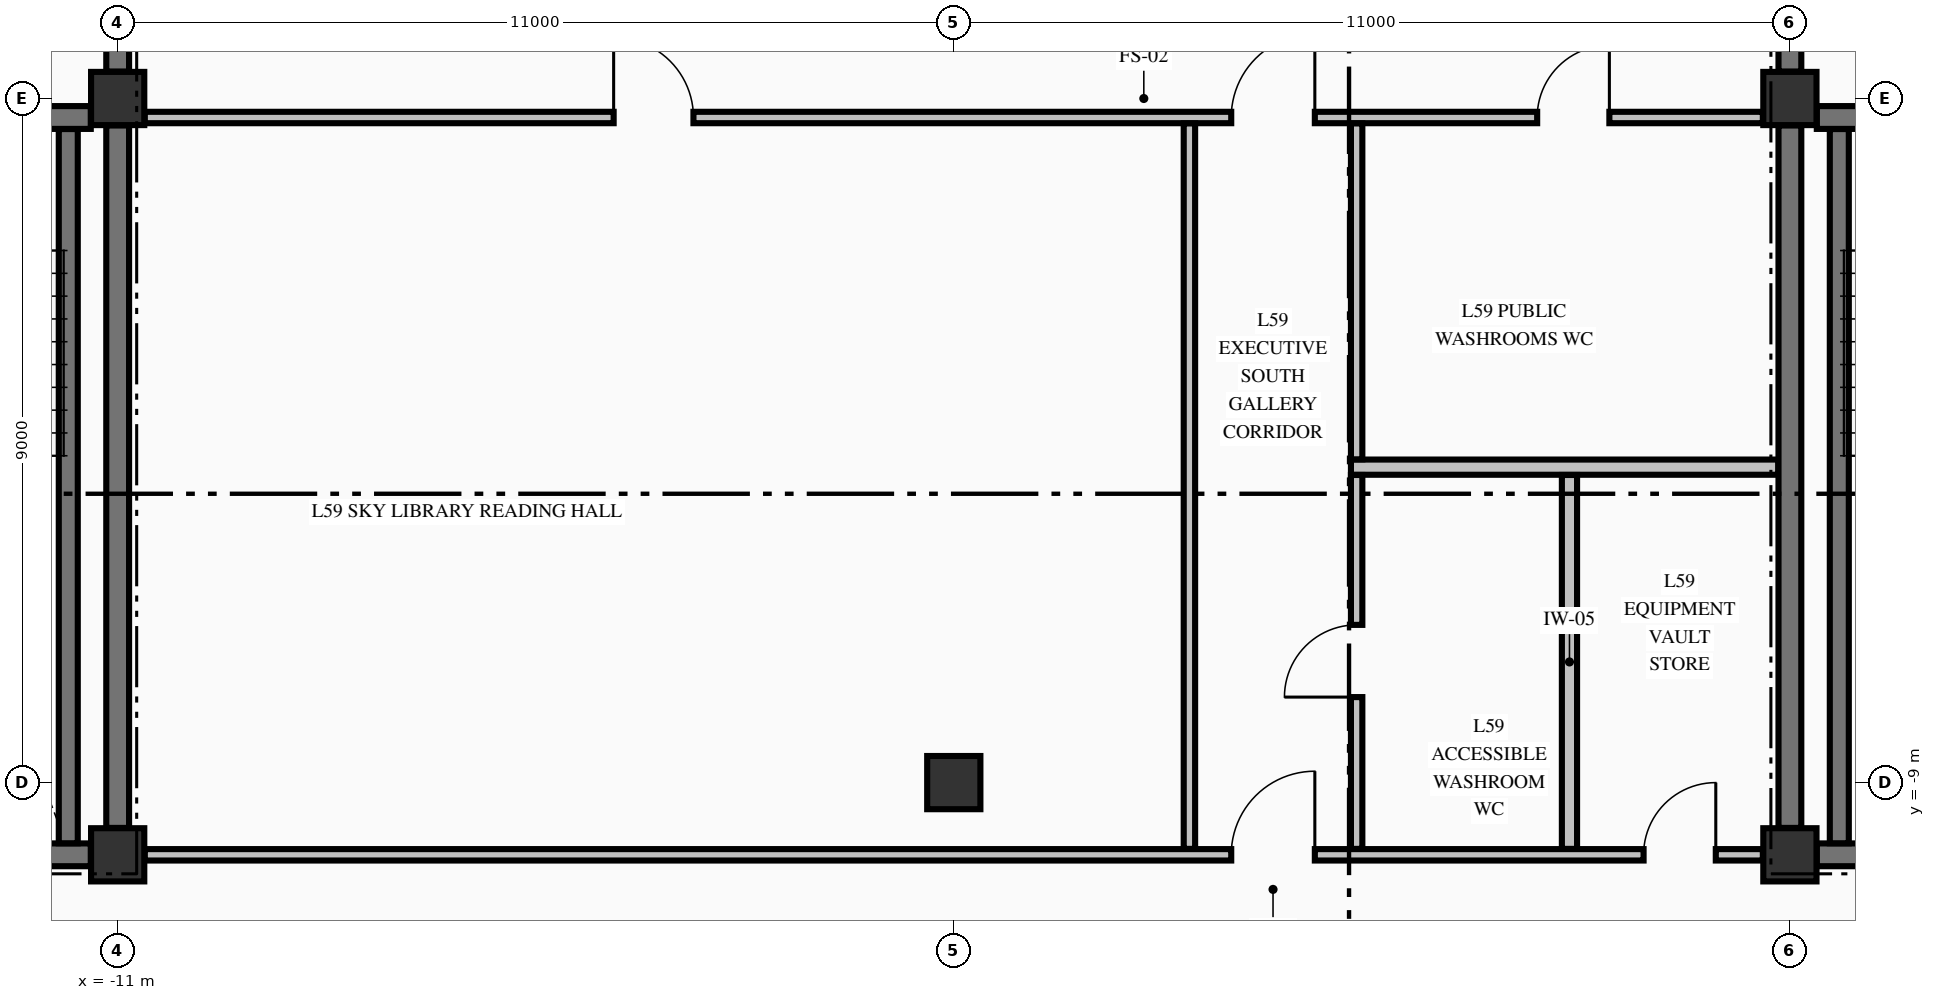
"""IFC4 building model, lengths in metres.
Left out: names, types, materials, properties, quantities, classifications, styles, units other than length and angle.
Written with IfcOpenShell. Run it as: python <this file> out.ifc"""

import sys

from ifc_helpers import new_model, si_unit, direction, frame, frame_2d, origin, origin_2d, place, context, subcontext, project, spatial, rectangle, extrude, element, fill, save


model = new_model("IFC4")
c1 = context("Model", 3, precision=1e-05, world=origin(), true_north=direction((0.0, 1.0)))
c2 = subcontext(c1, "Body", "Model", "MODEL_VIEW")
j1 = project(units=[si_unit("LENGTHUNIT", "METRE"), si_unit("PLANEANGLEUNIT", "RADIAN")], contexts=[c1])
p1 = place(None, origin())
s1 = spatial("IfcSite", under=j1, at=p1, CompositionType="ELEMENT")
p2 = place(p1, origin())
s2 = spatial("IfcBuilding", under=s1, at=p2, CompositionType="ELEMENT")
p3 = place(p2, frame((0.0, 0.0, 226.82)))
s3 = spatial("IfcBuildingStorey", under=s2, at=p3, CompositionType="ELEMENT", Elevation=226.82)
for number, where, z_axis, x_axis in (
    (1, (-11.0, -9.95, -0.425), (0.0, 0.0, 1.0), (1.0, 0.0, 0.0)),
    (2, (-11.0, 0.0, -0.425), (0.0, 0.0, 1.0), (1.0, 0.0, 0.0)),
    (3, (11.0, -9.95, -0.425), (0.0, 0.0, 1.0), (1.0, 0.0, 0.0)),
    (4, (11.0, 0.0, -0.425), (0.0, 0.0, 1.0), (1.0, 0.0, 0.0)),
    (5, (0.0, -9.0, -0.425), (0.0, 0.0, 1.0), (1.0, 0.0, 0.0)),
):
    element("IfcColumn", number, at=place(p3, frame(where, z_axis=z_axis, x_axis=x_axis)), inside=s3, PredefinedType="COLUMN", context=c2, shape_type="SweptSolid", body=[
        extrude(rectangle(XDim=0.7, YDim=0.7, at=origin_2d()), origin(), (0.0, 0.0, 1.0), 3.405),
    ])
for number, where, z_axis, x_axis in (
    (6, (-14.7, -9.95, 0.0), (0.0, 0.0, 1.0), (1.0, 0.0, 0.0)),
    (7, (11.354, -9.95, 0.0), (0.0, 0.0, 1.0), (1.0, 0.0, 0.0)),
):
    element("IfcWall", number, at=place(p3, frame(where, z_axis=z_axis, x_axis=x_axis)), inside=s3, PredefinedType="SHEAR", context=c2, shape_type="SweptSolid", body=[
        extrude(rectangle(XDim=3.346, YDim=0.3, at=frame_2d((1.673, 0.0))), origin(), (0.0, 0.0, 1.0), 2.98),
    ])
p4 = place(p3, frame((-20.571, -0.25, 0.0), z_axis=(0.0, 0.0, 1.0), x_axis=(1.0, 0.0, 0.0)))
e8 = element("IfcWall", 8, at=p4, inside=s3, PredefinedType="SHEAR", context=c2, shape_type="SweptSolid", body=[
    extrude(rectangle(XDim=9.217, YDim=0.3, at=frame_2d((4.608, 0.0))), origin(), (0.0, 0.0, 1.0), 2.98),
])
p5 = place(p4, frame((6.871, 0.0, 0.0)))
e9 = element("IfcOpeningElement", 9, at=p5, cuts=e8, PredefinedType="OPENING", context=c2, shape_type="SweptSolid", body=[
    extrude(rectangle(XDim=1.1, YDim=2.15, at=frame_2d((0.55, 1.075))), frame((0.0, 0.16, 0.0), z_axis=(0.0, -1.0, 0.0), x_axis=(1.0, 0.0, 0.0)), (0.0, 0.0, 1.0), 0.32),
])
p6 = place(p3, frame((11.354, -0.25, 0.0), z_axis=(0.0, 0.0, 1.0), x_axis=(1.0, 0.0, 0.0)))
e10 = element("IfcWall", 10, at=p6, inside=s3, PredefinedType="SHEAR", context=c2, shape_type="SweptSolid", body=[
    extrude(rectangle(XDim=3.521, YDim=0.3, at=frame_2d((1.76, 0.0))), origin(), (0.0, 0.0, 1.0), 2.98),
])
p7 = place(p6, frame((1.246, 0.0, 0.0)))
e11 = element("IfcOpeningElement", 11, at=p7, cuts=e10, PredefinedType="OPENING", context=c2, shape_type="SweptSolid", body=[
    extrude(rectangle(XDim=1.1, YDim=2.15, at=frame_2d((0.55, 1.075))), frame((0.0, 0.16, 0.0), z_axis=(0.0, -1.0, 0.0), x_axis=(1.0, 0.0, 0.0)), (0.0, 0.0, 1.0), 0.32),
])
p8 = place(p3, frame((-10.644, -9.95, 0.0), z_axis=(0.0, 0.0, 1.0), x_axis=(1.0, 0.0, 0.0)))
e12 = element("IfcWall", 12, at=p8, inside=s3, PredefinedType="PARTITIONING", context=c2, shape_type="SweptSolid", body=[
    extrude(rectangle(XDim=21.288, YDim=0.15, at=frame_2d((10.644, 0.0))), origin(), (0.0, 0.0, 1.0), 2.98),
])
p9 = place(p8, frame((14.294, 0.0, 0.0)))
e13 = element("IfcOpeningElement", 13, at=p9, cuts=e12, PredefinedType="OPENING", context=c2, shape_type="SweptSolid", body=[
    extrude(rectangle(XDim=1.1, YDim=2.15, at=frame_2d((0.55, 1.075))), frame((0.0, 0.085, 0.0), z_axis=(0.0, -1.0, 0.0), x_axis=(1.0, 0.0, 0.0)), (0.0, 0.0, 1.0), 0.17),
])
p10 = place(p8, frame((19.719, 0.0, 0.0)))
e14 = element("IfcOpeningElement", 14, at=p10, cuts=e12, PredefinedType="OPENING", context=c2, shape_type="SweptSolid", body=[
    extrude(rectangle(XDim=0.95, YDim=2.15, at=frame_2d((0.475, 1.075))), frame((0.0, 0.085, 0.0), z_axis=(0.0, -1.0, 0.0), x_axis=(1.0, 0.0, 0.0)), (0.0, 0.0, 1.0), 0.17),
])
p11 = place(p3, frame((5.225, -4.85, 0.0), z_axis=(0.0, 0.0, 1.0), x_axis=(1.0, 0.0, 0.0)))
e15 = element("IfcWall", 15, at=p11, inside=s3, PredefinedType="PARTITIONING", context=c2, shape_type="SweptSolid", body=[
    extrude(rectangle(XDim=5.622, YDim=0.2, at=frame_2d((2.811, 0.0))), origin(), (0.0, 0.0, 1.0), 2.98),
])
p12 = place(p3, frame((-10.644, -0.25, 0.0), z_axis=(0.0, 0.0, 1.0), x_axis=(1.0, 0.0, 0.0)))
e16 = element("IfcWall", 16, at=p12, inside=s3, PredefinedType="PARTITIONING", context=c2, shape_type="SweptSolid", body=[
    extrude(rectangle(XDim=21.288, YDim=0.15, at=frame_2d((10.644, 0.0))), origin(), (0.0, 0.0, 1.0), 2.98),
])
p13 = place(p12, frame((14.294, 0.0, 0.0)))
e17 = element("IfcOpeningElement", 17, at=p13, cuts=e16, PredefinedType="OPENING", context=c2, shape_type="SweptSolid", body=[
    extrude(rectangle(XDim=1.1, YDim=2.15, at=frame_2d((0.55, 1.075))), frame((0.0, 0.085, 0.0), z_axis=(0.0, -1.0, 0.0), x_axis=(1.0, 0.0, 0.0)), (0.0, 0.0, 1.0), 0.17),
])
p14 = place(p12, frame((6.169, 0.0, 0.0)))
e18 = element("IfcOpeningElement", 18, at=p14, cuts=e16, PredefinedType="OPENING", context=c2, shape_type="SweptSolid", body=[
    extrude(rectangle(XDim=1.05, YDim=2.15, at=frame_2d((0.525, 1.075))), frame((0.0, 0.085, 0.0), z_axis=(0.0, -1.0, 0.0), x_axis=(1.0, 0.0, 0.0)), (0.0, 0.0, 1.0), 0.17),
])
p15 = place(p12, frame((18.319, 0.0, 0.0)))
e19 = element("IfcOpeningElement", 19, at=p15, cuts=e16, PredefinedType="OPENING", context=c2, shape_type="SweptSolid", body=[
    extrude(rectangle(XDim=0.95, YDim=2.15, at=frame_2d((0.475, 1.075))), frame((0.0, 0.085, 0.0), z_axis=(0.0, -1.0, 0.0), x_axis=(1.0, 0.0, 0.0)), (0.0, 0.0, 1.0), 0.17),
])
p16 = place(p3, frame((-11.65, -9.798, 0.0), z_axis=(0.0, 0.0, 1.0), x_axis=(0.0, 1.0, 0.0)))
e20 = element("IfcWall", 20, at=p16, inside=s3, PredefinedType="SOLIDWALL", context=c2, shape_type="SweptSolid", body=[
    extrude(rectangle(XDim=9.396, YDim=0.25, at=frame_2d((4.698, 0.0))), origin(), (0.0, 0.0, 1.0), 2.98),
])
p17 = place(p3, frame((-11.0, -9.596, 0.0), z_axis=(0.0, 0.0, 1.0), x_axis=(0.0, 1.0, 0.0)))
e21 = element("IfcWall", 21, at=p17, inside=s3, PredefinedType="SHEAR", context=c2, shape_type="SweptSolid", body=[
    extrude(rectangle(XDim=9.242, YDim=0.3, at=frame_2d((4.621, 0.0))), origin(), (0.0, 0.0, 1.0), 2.98),
])
p18 = place(p3, frame((-11.0, 0.354, 0.0), z_axis=(0.0, 0.0, 1.0), x_axis=(0.0, 1.0, 0.0)))
e22 = element("IfcWall", 22, at=p18, inside=s3, PredefinedType="SHEAR", context=c2, shape_type="SweptSolid", body=[
    extrude(rectangle(XDim=2.394, YDim=0.3, at=frame_2d((1.197, 0.0))), origin(), (0.0, 0.0, 1.0), 2.98),
])
p19 = place(p18, frame((0.746, 0.0, 0.0)))
e23 = element("IfcOpeningElement", 23, at=p19, cuts=e22, PredefinedType="OPENING", context=c2, shape_type="SweptSolid", body=[
    extrude(rectangle(XDim=1.1, YDim=2.15, at=frame_2d((0.55, 1.075))), frame((0.0, 0.16, 0.0), z_axis=(0.0, -1.0, 0.0), x_axis=(1.0, 0.0, 0.0)), (0.0, 0.0, 1.0), 0.32),
])
p20 = place(p3, frame((11.0, -9.596, 0.0), z_axis=(0.0, 0.0, 1.0), x_axis=(0.0, 1.0, 0.0)))
e24 = element("IfcWall", 24, at=p20, inside=s3, PredefinedType="SHEAR", context=c2, shape_type="SweptSolid", body=[
    extrude(rectangle(XDim=9.242, YDim=0.3, at=frame_2d((4.621, 0.0))), origin(), (0.0, 0.0, 1.0), 2.98),
])
p21 = place(p3, frame((11.0, 0.354, 0.0), z_axis=(0.0, 0.0, 1.0), x_axis=(0.0, 1.0, 0.0)))
e25 = element("IfcWall", 25, at=p21, inside=s3, PredefinedType="SHEAR", context=c2, shape_type="SweptSolid", body=[
    extrude(rectangle(XDim=2.394, YDim=0.3, at=frame_2d((1.197, 0.0))), origin(), (0.0, 0.0, 1.0), 2.98),
])
p22 = place(p21, frame((0.746, 0.0, 0.0)))
e26 = element("IfcOpeningElement", 26, at=p22, cuts=e25, PredefinedType="OPENING", context=c2, shape_type="SweptSolid", body=[
    extrude(rectangle(XDim=1.1, YDim=2.15, at=frame_2d((0.55, 1.075))), frame((0.0, 0.16, 0.0), z_axis=(0.0, -1.0, 0.0), x_axis=(1.0, 0.0, 0.0)), (0.0, 0.0, 1.0), 0.32),
])
p23 = place(p3, frame((11.65, -9.798, 0.0), z_axis=(0.0, 0.0, 1.0), x_axis=(0.0, 1.0, 0.0)))
e27 = element("IfcWall", 27, at=p23, inside=s3, PredefinedType="SOLIDWALL", context=c2, shape_type="SweptSolid", body=[
    extrude(rectangle(XDim=9.396, YDim=0.25, at=frame_2d((4.698, 0.0))), origin(), (0.0, 0.0, 1.0), 2.98),
])
p24 = place(p3, frame((3.1, -9.872, 0.0), z_axis=(0.0, 0.0, 1.0), x_axis=(0.0, 1.0, 0.0)))
e28 = element("IfcWall", 28, at=p24, inside=s3, PredefinedType="PARTITIONING", context=c2, shape_type="SweptSolid", body=[
    extrude(rectangle(XDim=9.544, YDim=0.15, at=frame_2d((4.772, 0.0))), origin(), (0.0, 0.0, 1.0), 2.98),
])
p25 = place(p3, frame((5.3, -9.872, 0.0), z_axis=(0.0, 0.0, 1.0), x_axis=(0.0, 1.0, 0.0)))
e29 = element("IfcWall", 29, at=p25, inside=s3, PredefinedType="PARTITIONING", context=c2, shape_type="SweptSolid", body=[
    extrude(rectangle(XDim=4.919, YDim=0.15, at=frame_2d((2.459, 0.0))), origin(), (0.0, 0.0, 1.0), 2.98),
])
p26 = place(p25, frame((1.997, 0.0, 0.0)))
e30 = element("IfcOpeningElement", 30, at=p26, cuts=e29, PredefinedType="OPENING", context=c2, shape_type="SweptSolid", body=[
    extrude(rectangle(XDim=0.95, YDim=2.15, at=frame_2d((0.475, 1.075))), frame((0.0, 0.085, 0.0), z_axis=(0.0, -1.0, 0.0), x_axis=(1.0, 0.0, 0.0)), (0.0, 0.0, 1.0), 0.17),
])
p27 = place(p3, frame((5.3, -4.747, 0.0), z_axis=(0.0, 0.0, 1.0), x_axis=(0.0, 1.0, 0.0)))
e31 = element("IfcWall", 31, at=p27, inside=s3, PredefinedType="PARTITIONING", context=c2, shape_type="SweptSolid", body=[
    extrude(rectangle(XDim=4.419, YDim=0.15, at=frame_2d((2.209, 0.0))), origin(), (0.0, 0.0, 1.0), 2.98),
])
p28 = place(p3, frame((8.1, -9.872, 0.0), z_axis=(0.0, 0.0, 1.0), x_axis=(0.0, 1.0, 0.0)))
e32 = element("IfcWall", 32, at=p28, inside=s3, PredefinedType="PARTITIONING", context=c2, shape_type="SweptSolid", body=[
    extrude(rectangle(XDim=4.919, YDim=0.2, at=frame_2d((2.459, 0.0))), origin(), (0.0, 0.0, 1.0), 2.98),
])
p29 = place(p9, origin())
e33 = element("IfcDoor", 33, at=p29, inside=s3, OperationType="SINGLE_SWING_RIGHT", PredefinedType="DOOR", context=c2, shape_type="SweptSolid", body=[
    extrude(rectangle(XDim=1.1, YDim=2.15, at=frame_2d((0.55, 1.075))), frame((0.0, 0.025, 0.0), z_axis=(0.0, -1.0, 0.0), x_axis=(1.0, 0.0, 0.0)), (0.0, 0.0, 1.0), 0.05),
])
fill(e13, e33)
p30 = place(p13, origin())
e34 = element("IfcDoor", 34, at=p30, inside=s3, OperationType="SINGLE_SWING_RIGHT", PredefinedType="DOOR", context=c2, shape_type="SweptSolid", body=[
    extrude(rectangle(XDim=1.1, YDim=2.15, at=frame_2d((0.55, 1.075))), frame((0.0, 0.025, 0.0), z_axis=(0.0, -1.0, 0.0), x_axis=(1.0, 0.0, 0.0)), (0.0, 0.0, 1.0), 0.05),
])
fill(e17, e34)
p31 = place(p14, origin())
e35 = element("IfcDoor", 35, at=p31, inside=s3, OperationType="SINGLE_SWING_LEFT", PredefinedType="DOOR", context=c2, shape_type="SweptSolid", body=[
    extrude(rectangle(XDim=1.05, YDim=2.15, at=frame_2d((0.525, 1.075))), frame((0.0, 0.025, 0.0), z_axis=(0.0, -1.0, 0.0), x_axis=(1.0, 0.0, 0.0)), (0.0, 0.0, 1.0), 0.05),
])
fill(e18, e35)
p32 = place(p15, origin())
e36 = element("IfcDoor", 36, at=p32, inside=s3, OperationType="SINGLE_SWING_RIGHT", PredefinedType="DOOR", context=c2, shape_type="SweptSolid", body=[
    extrude(rectangle(XDim=0.95, YDim=2.15, at=frame_2d((0.475, 1.075))), frame((0.0, 0.025, 0.0), z_axis=(0.0, -1.0, 0.0), x_axis=(1.0, 0.0, 0.0)), (0.0, 0.0, 1.0), 0.05),
])
fill(e19, e36)
p33 = place(p26, origin())
e37 = element("IfcDoor", 37, at=p33, inside=s3, OperationType="SINGLE_SWING_LEFT", PredefinedType="DOOR", context=c2, shape_type="SweptSolid", body=[
    extrude(rectangle(XDim=0.95, YDim=2.15, at=frame_2d((0.475, 1.075))), frame((0.0, 0.025, 0.0), z_axis=(0.0, -1.0, 0.0), x_axis=(1.0, 0.0, 0.0)), (0.0, 0.0, 1.0), 0.05),
])
fill(e30, e37)
p34 = place(p10, origin())
e38 = element("IfcDoor", 38, at=p34, inside=s3, OperationType="SINGLE_SWING_RIGHT", PredefinedType="DOOR", context=c2, shape_type="SweptSolid", body=[
    extrude(rectangle(XDim=0.95, YDim=2.15, at=frame_2d((0.475, 1.075))), frame((0.0, 0.025, 0.0), z_axis=(0.0, -1.0, 0.0), x_axis=(1.0, 0.0, 0.0)), (0.0, 0.0, 1.0), 0.05),
])
fill(e14, e38)
save(model, sys.argv[1])
